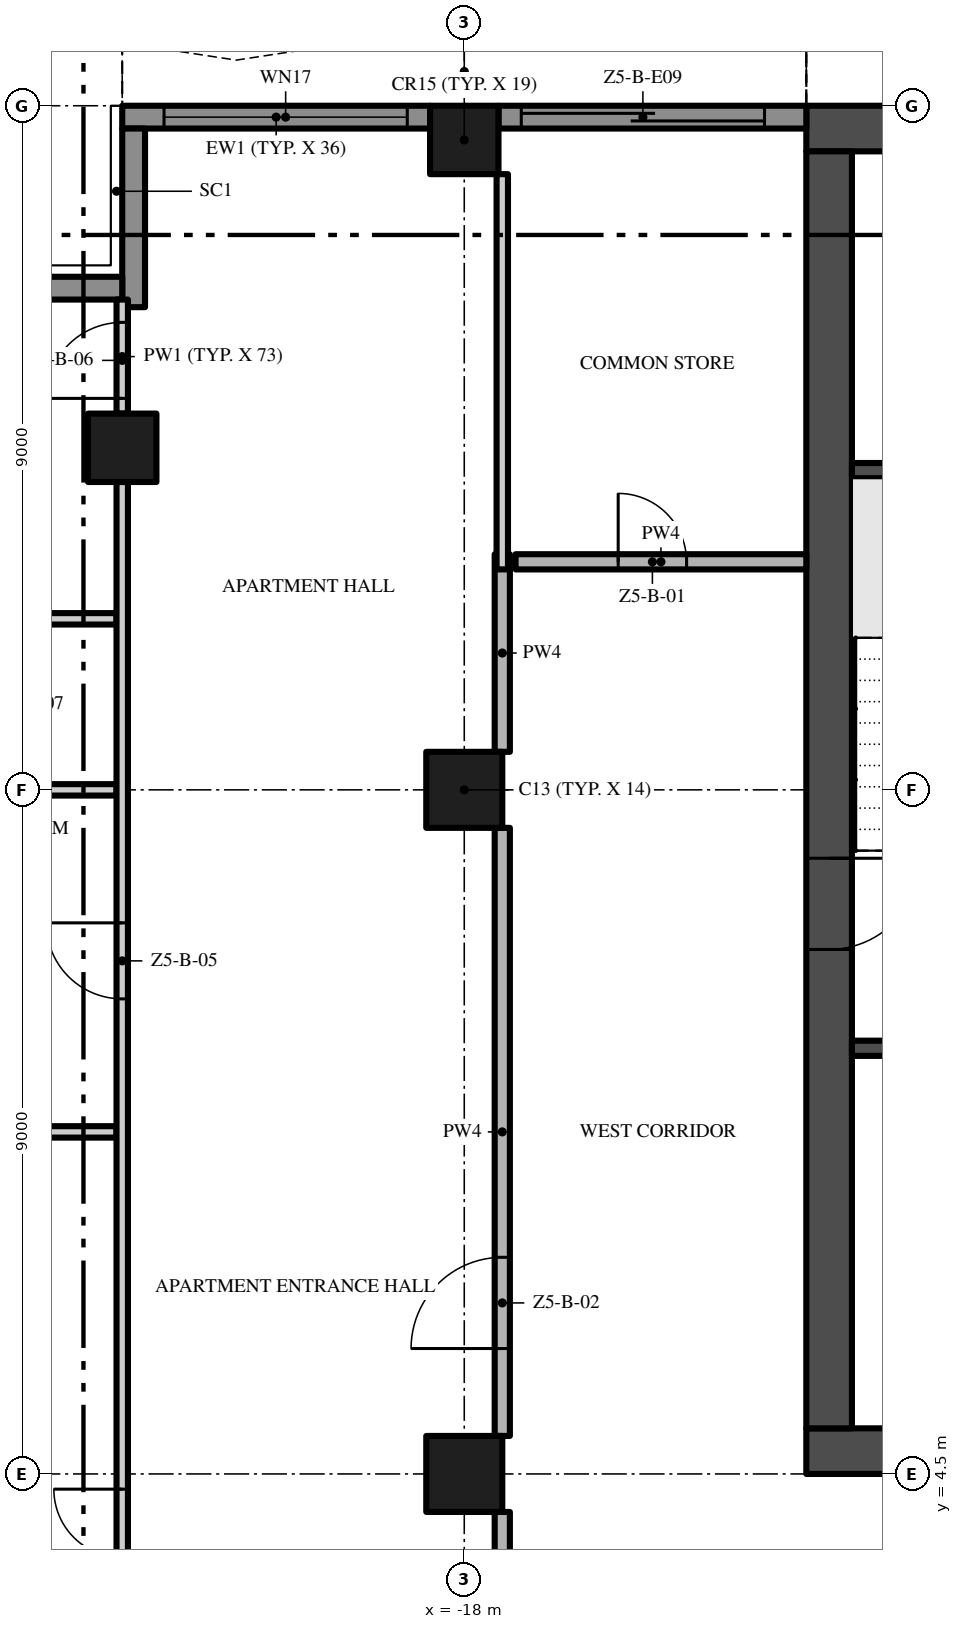
"""IFC4 building model, lengths in metres.
Left out: names, types, materials, properties, quantities, classifications, styles, units other than length and angle.
Written with IfcOpenShell. Run it as: python <this file> out.ifc"""

import sys

from ifc_helpers import new_model, si_unit, direction, frame, frame_2d, origin, origin_2d, place, context, subcontext, project, spatial, polyline, rectangle, outline, extrude, element, fill, save


model = new_model("IFC4")
c1 = context("Model", 3, precision=1e-05, world=origin(), true_north=direction((0.0, 1.0)))
c2 = subcontext(c1, "Body", "Model", "MODEL_VIEW")
j1 = project(units=[si_unit("LENGTHUNIT", "METRE"), si_unit("PLANEANGLEUNIT", "RADIAN")], contexts=[c1])
p1 = place(None, origin())
s1 = spatial("IfcSite", under=j1, at=p1, CompositionType="ELEMENT")
p2 = place(p1, origin())
s2 = spatial("IfcBuilding", under=s1, at=p2, CompositionType="ELEMENT")
p3 = place(p2, frame((0.0, 0.0, 250.2)))
s3 = spatial("IfcBuildingStorey", under=s2, at=p3, CompositionType="ELEMENT", Elevation=250.2)
p4 = place(p3, frame((-13.5, 4.8, -0.3), z_axis=(0.0, 0.0, 1.0), x_axis=(1.0, 0.0, 0.0)))
e1 = element("IfcWall", 1, at=p4, inside=s3, PredefinedType="SHEAR", context=c2, shape_type="SweptSolid", body=[
    extrude(rectangle(XDim=27.0, YDim=0.6, at=frame_2d((13.5, 0.0))), origin(), (0.0, 0.0, 1.0), 3.8),
])
p5 = place(p4, frame((12.0, 0.0, 0.3)))
e2 = element("IfcOpeningElement", 2, at=p5, cuts=e1, PredefinedType="OPENING", context=c2, shape_type="SweptSolid", body=[
    extrude(rectangle(XDim=3.0, YDim=2.4, at=frame_2d((1.5, 1.2))), frame((0.0, 0.31, 0.0), z_axis=(0.0, -1.0, 0.0), x_axis=(1.0, 0.0, 0.0)), (0.0, 0.0, 1.0), 0.62),
])
p6 = place(p4, frame((4.9, 0.0, 0.3)))
e3 = element("IfcOpeningElement", 3, at=p6, cuts=e1, PredefinedType="OPENING", context=c2, shape_type="SweptSolid", body=[
    extrude(rectangle(XDim=1.2, YDim=2.2, at=frame_2d((0.6, 1.1))), frame((0.0, 0.31, 0.0), z_axis=(0.0, -1.0, 0.0), x_axis=(1.0, 0.0, 0.0)), (0.0, 0.0, 1.0), 0.62),
])
p7 = place(p4, frame((20.75, 0.0, 0.3)))
e4 = element("IfcOpeningElement", 4, at=p7, cuts=e1, PredefinedType="OPENING", context=c2, shape_type="SweptSolid", body=[
    extrude(rectangle(XDim=1.5, YDim=2.2, at=frame_2d((0.75, 1.1))), frame((0.0, 0.31, 0.0), z_axis=(0.0, -1.0, 0.0), x_axis=(1.0, 0.0, 0.0)), (0.0, 0.0, 1.0), 0.62),
])
p8 = place(p4, frame((17.4, 0.0, 0.3)))
e5 = element("IfcOpeningElement", 5, at=p8, cuts=e1, PredefinedType="OPENING", context=c2, shape_type="SweptSolid", body=[
    extrude(rectangle(XDim=1.2, YDim=2.2, at=frame_2d((0.6, 1.1))), frame((0.0, 0.31, 0.0), z_axis=(0.0, -1.0, 0.0), x_axis=(1.0, 0.0, 0.0)), (0.0, 0.0, 1.0), 0.62),
])
p9 = place(p3, frame((13.5, 22.2, -0.3), z_axis=(0.0, 0.0, 1.0), x_axis=(-1.0, 0.0, 0.0)))
e6 = element("IfcWall", 6, at=p9, inside=s3, PredefinedType="SHEAR", context=c2, shape_type="SweptSolid", body=[
    extrude(rectangle(XDim=27.0, YDim=0.6, at=frame_2d((13.5, 0.0))), origin(), (0.0, 0.0, 1.0), 3.8),
])
p10 = place(p3, frame((-13.2, 21.9, -0.3), z_axis=(0.0, 0.0, 1.0), x_axis=(0.0, -1.0, 0.0)))
e7 = element("IfcWall", 7, at=p10, inside=s3, PredefinedType="SHEAR", context=c2, shape_type="SweptSolid", body=[
    extrude(rectangle(XDim=16.8, YDim=0.6, at=frame_2d((8.4, 0.0))), origin(), (0.0, 0.0, 1.0), 3.8),
])
p11 = place(p10, frame((9.3, 0.0, 0.3)))
e8 = element("IfcOpeningElement", 8, at=p11, cuts=e7, PredefinedType="OPENING", context=c2, shape_type="SweptSolid", body=[
    extrude(rectangle(XDim=1.2, YDim=2.2, at=frame_2d((0.6, 1.1))), frame((0.0, 0.31, 0.0), z_axis=(0.0, -1.0, 0.0), x_axis=(1.0, 0.0, 0.0)), (0.0, 0.0, 1.0), 0.62),
])
p12 = place(p3, frame((-18.0, 13.5, 0.0), z_axis=(0.0, 0.0, 1.0), x_axis=(1.0, 0.0, 0.0)))
e9 = element("IfcColumn", 9, at=p12, inside=s3, PredefinedType="COLUMN", context=c2, shape_type="SweptSolid", body=[
    extrude(rectangle(XDim=1.0, YDim=1.0, at=origin_2d()), origin(), (0.0, 0.0, 1.0), 3.5),
])
p13 = place(p3, frame((-18.0, 22.05, 0.0), z_axis=(0.0, 0.0, 1.0), x_axis=(1.0, 0.0, 0.0)))
e10 = element("IfcColumn", 10, at=p13, inside=s3, PredefinedType="COLUMN", context=c2, shape_type="SweptSolid", body=[
    extrude(rectangle(XDim=0.9, YDim=0.9, at=origin_2d()), origin(), (0.0, 0.0, 1.0), 3.5),
])
p14 = place(p3, frame((-18.0, 4.5, 0.0), z_axis=(0.0, 0.0, 1.0), x_axis=(1.0, 0.0, 0.0)))
e11 = element("IfcColumn", 11, at=p14, inside=s3, PredefinedType="COLUMN", context=c2, shape_type="SweptSolid", body=[
    extrude(rectangle(XDim=1.0, YDim=1.0, at=origin_2d()), origin(), (0.0, 0.0, 1.0), 3.5),
])
p15 = place(p3, frame((-22.5, 18.0, 0.0), z_axis=(0.0, 0.0, 1.0), x_axis=(1.0, 0.0, 0.0)))
e12 = element("IfcColumn", 12, at=p15, inside=s3, PredefinedType="COLUMN", context=c2, shape_type="SweptSolid", body=[
    extrude(rectangle(XDim=0.9, YDim=0.9, at=origin_2d()), origin(), (0.0, 0.0, 1.0), 3.5),
])
p16 = place(p3, frame((-17.55, 22.35, 0.0), z_axis=(0.0, 0.0, 1.0), x_axis=(1.0, 0.0, 0.0)))
e13 = element("IfcWall", 13, at=p16, inside=s3, PredefinedType="SOLIDWALL", context=c2, shape_type="SweptSolid", body=[
    extrude(rectangle(XDim=4.05, YDim=0.3, at=frame_2d((2.025, 0.0))), origin(), (0.0, 0.0, 1.0), 3.5),
])
p17 = place(p16, frame((0.3, 0.0, 0.0)))
e14 = element("IfcOpeningElement", 14, at=p17, cuts=e13, PredefinedType="OPENING", context=c2, shape_type="SweptSolid", body=[
    extrude(rectangle(XDim=3.2, YDim=2.4, at=frame_2d((1.6, 1.2))), frame((0.0, 0.16, 0.0), z_axis=(0.0, -1.0, 0.0), x_axis=(1.0, 0.0, 0.0)), (0.0, 0.0, 1.0), 0.32),
])
p18 = place(p3, frame((-22.5, 22.35, 0.0), z_axis=(0.0, 0.0, 1.0), x_axis=(1.0, 0.0, 0.0)))
e15 = element("IfcWall", 15, at=p18, inside=s3, PredefinedType="SOLIDWALL", context=c2, shape_type="SweptSolid", body=[
    extrude(rectangle(XDim=4.05, YDim=0.3, at=frame_2d((2.025, 0.0))), origin(), (0.0, 0.0, 1.0), 3.5),
])
p19 = place(p18, frame((0.55, 0.0, 0.45)))
e16 = element("IfcOpeningElement", 16, at=p19, cuts=e15, PredefinedType="OPENING", context=c2, shape_type="SweptSolid", body=[
    extrude(rectangle(XDim=3.2, YDim=2.65, at=frame_2d((1.6, 1.325))), frame((0.0, 0.16, 0.0), z_axis=(0.0, -1.0, 0.0), x_axis=(1.0, 0.0, 0.0)), (0.0, 0.0, 1.0), 0.32),
])
p20 = place(p3, frame((-22.35, 19.85, 0.0), z_axis=(0.0, 0.0, 1.0), x_axis=(0.0, 1.0, 0.0)))
e17 = element("IfcWall", 17, at=p20, inside=s3, PredefinedType="SOLIDWALL", context=c2, shape_type="SweptSolid", body=[
    extrude(rectangle(XDim=2.35, YDim=0.3, at=frame_2d((1.175, 0.0))), origin(), (0.0, 0.0, 1.0), 3.5),
])
p21 = place(p3, frame((-24.75, 20.1, 0.0), z_axis=(0.0, 0.0, 1.0), x_axis=(1.0, 0.0, 0.0)))
e18 = element("IfcWall", 18, at=p21, inside=s3, PredefinedType="SOLIDWALL", context=c2, shape_type="SweptSolid", body=[
    extrude(rectangle(XDim=2.25, YDim=0.3, at=frame_2d((1.125, 0.0))), origin(), (0.0, 0.0, 1.0), 3.5),
])
p22 = place(p3, origin())
e19 = element("IfcWall", 19, at=p22, inside=s3, PredefinedType="USERDEFINED", context=c2, shape_type="SweptSolid", body=[
    extrude(outline(polyline([(-13.5, 25.5), (-15.0, 25.271), (-16.5, 24.671), (-18.0, 23.929), (-19.5, 23.329), (-21.0, 23.1), (-22.5, 23.329), (-22.538, 23.082), (-21.0, 22.847), (-19.434, 23.086), (-17.898, 23.701), (-16.398, 24.442), (-14.934, 25.028), (-13.462, 25.253), (-13.5, 25.5)])), origin(), (0.0, 0.0, 1.0), 0.9),
])
for number, where, z_axis, x_axis in (
    (20, (-12.9, 10.1, 0.0), (0.0, 0.0, 1.0), (1.0, 0.0, 0.0)),
    (21, (-12.9, 17.7, 0.0), (0.0, 0.0, 1.0), (1.0, 0.0, 0.0)),
):
    element("IfcWall", number, at=place(p3, frame(where, z_axis=z_axis, x_axis=x_axis)), inside=s3, PredefinedType="SHEAR", context=c2, shape_type="SweptSolid", body=[
        extrude(rectangle(XDim=3.25, YDim=0.2, at=frame_2d((1.625, 0.0))), origin(), (0.0, 0.0, 1.0), 3.5),
    ])
p23 = place(p3, frame((-26.7, 9.0, 0.0), z_axis=(0.0, 0.0, 1.0), x_axis=(1.0, 0.0, 0.0)))
e22 = element("IfcWall", 22, at=p23, inside=s3, PredefinedType="PARTITIONING", context=c2, shape_type="SweptSolid", body=[
    extrude(rectangle(XDim=4.125, YDim=0.15, at=frame_2d((2.062, 0.0))), origin(), (0.0, 0.0, 1.0), 3.5),
])
p24 = place(p3, frame((-26.1, 13.5, 0.0), z_axis=(0.0, 0.0, 1.0), x_axis=(1.0, 0.0, 0.0)))
e23 = element("IfcWall", 23, at=p24, inside=s3, PredefinedType="PARTITIONING", context=c2, shape_type="SweptSolid", body=[
    extrude(rectangle(XDim=3.525, YDim=0.15, at=frame_2d((1.762, 0.0))), origin(), (0.0, 0.0, 1.0), 3.5),
])
p25 = place(p3, frame((-24.45, 15.75, 0.0), z_axis=(0.0, 0.0, 1.0), x_axis=(1.0, 0.0, 0.0)))
e24 = element("IfcWall", 24, at=p25, inside=s3, PredefinedType="PARTITIONING", context=c2, shape_type="SweptSolid", body=[
    extrude(rectangle(XDim=1.875, YDim=0.15, at=frame_2d((0.938, 0.0))), origin(), (0.0, 0.0, 1.0), 3.5),
])
p26 = place(p3, frame((-17.325, 16.5, 0.0), z_axis=(0.0, 0.0, 1.0), x_axis=(1.0, 0.0, 0.0)))
e25 = element("IfcWall", 25, at=p26, inside=s3, PredefinedType="PARTITIONING", context=c2, shape_type="SweptSolid", body=[
    extrude(rectangle(XDim=3.825, YDim=0.2, at=frame_2d((1.913, 0.0))), origin(), (0.0, 0.0, 1.0), 3.5),
])
p27 = place(p26, frame((1.35, 0.0, 0.0)))
e26 = element("IfcOpeningElement", 26, at=p27, cuts=e25, PredefinedType="OPENING", context=c2, shape_type="SweptSolid", body=[
    extrude(rectangle(XDim=0.9, YDim=2.1, at=frame_2d((0.45, 1.05))), frame((0.0, 0.11, 0.0), z_axis=(0.0, -1.0, 0.0), x_axis=(1.0, 0.0, 0.0)), (0.0, 0.0, 1.0), 0.22),
])
p28 = place(p3, frame((-22.5, 0.1, 0.0), z_axis=(0.0, 0.0, 1.0), x_axis=(0.0, 1.0, 0.0)))
e27 = element("IfcWall", 27, at=p28, inside=s3, PredefinedType="PARTITIONING", context=c2, shape_type="SweptSolid", body=[
    extrude(rectangle(XDim=17.45, YDim=0.15, at=frame_2d((8.725, 0.0))), origin(), (0.0, 0.0, 1.0), 3.5),
])
p29 = place(p28, frame((2.4, 0.0, 0.0)))
e28 = element("IfcOpeningElement", 28, at=p29, cuts=e27, PredefinedType="OPENING", context=c2, shape_type="SweptSolid", body=[
    extrude(rectangle(XDim=1.8, YDim=2.4, at=frame_2d((0.9, 1.2))), frame((0.0, 0.085, 0.0), z_axis=(0.0, -1.0, 0.0), x_axis=(1.0, 0.0, 0.0)), (0.0, 0.0, 1.0), 0.17),
])
p30 = place(p28, frame((10.65, 0.0, 0.0)))
e29 = element("IfcOpeningElement", 29, at=p30, cuts=e27, PredefinedType="OPENING", context=c2, shape_type="SweptSolid", body=[
    extrude(rectangle(XDim=1.0, YDim=2.4, at=frame_2d((0.5, 1.2))), frame((0.0, 0.085, 0.0), z_axis=(0.0, -1.0, 0.0), x_axis=(1.0, 0.0, 0.0)), (0.0, 0.0, 1.0), 0.17),
])
p31 = place(p3, frame((-22.5, 18.45, 0.0), z_axis=(0.0, 0.0, 1.0), x_axis=(0.0, 1.0, 0.0)))
e30 = element("IfcWall", 30, at=p31, inside=s3, PredefinedType="PARTITIONING", context=c2, shape_type="SweptSolid", body=[
    extrude(rectangle(XDim=1.5, YDim=0.15, at=frame_2d((0.75, 0.0))), origin(), (0.0, 0.0, 1.0), 3.5),
])
p32 = place(p31, frame((0.2, 0.0, 0.0)))
e31 = element("IfcOpeningElement", 31, at=p32, cuts=e30, PredefinedType="OPENING", context=c2, shape_type="SweptSolid", body=[
    extrude(rectangle(XDim=1.0, YDim=2.4, at=frame_2d((0.5, 1.2))), frame((0.0, 0.085, 0.0), z_axis=(0.0, -1.0, 0.0), x_axis=(1.0, 0.0, 0.0)), (0.0, 0.0, 1.0), 0.17),
])
p33 = place(p3, frame((-17.5, -0.2, 0.0), z_axis=(0.0, 0.0, 1.0), x_axis=(0.0, 1.0, 0.0)))
e32 = element("IfcWall", 32, at=p33, inside=s3, PredefinedType="PARTITIONING", context=c2, shape_type="SweptSolid", body=[
    extrude(rectangle(XDim=4.2, YDim=0.2, at=frame_2d((2.1, 0.0))), origin(), (0.0, 0.0, 1.0), 3.5),
])
p34 = place(p3, frame((-17.5, 5.0, 0.0), z_axis=(0.0, 0.0, 1.0), x_axis=(0.0, 1.0, 0.0)))
e33 = element("IfcWall", 33, at=p34, inside=s3, PredefinedType="PARTITIONING", context=c2, shape_type="SweptSolid", body=[
    extrude(rectangle(XDim=8.0, YDim=0.2, at=frame_2d((4.0, 0.0))), origin(), (0.0, 0.0, 1.0), 3.5),
])
p35 = place(p34, frame((1.15, 0.0, 0.0)))
e34 = element("IfcOpeningElement", 34, at=p35, cuts=e33, PredefinedType="OPENING", context=c2, shape_type="SweptSolid", body=[
    extrude(rectangle(XDim=1.2, YDim=2.4, at=frame_2d((0.6, 1.2))), frame((0.0, 0.11, 0.0), z_axis=(0.0, -1.0, 0.0), x_axis=(1.0, 0.0, 0.0)), (0.0, 0.0, 1.0), 0.22),
])
p36 = place(p3, frame((-17.5, 14.0, 0.0), z_axis=(0.0, 0.0, 1.0), x_axis=(0.0, 1.0, 0.0)))
e35 = element("IfcWall", 35, at=p36, inside=s3, PredefinedType="PARTITIONING", context=c2, shape_type="SweptSolid", body=[
    extrude(rectangle(XDim=2.6, YDim=0.2, at=frame_2d((1.3, 0.0))), origin(), (0.0, 0.0, 1.0), 3.5),
])
p37 = place(p3, frame((-17.5, 16.4, 0.0), z_axis=(0.0, 0.0, 1.0), x_axis=(0.0, 1.0, 0.0)))
e36 = element("IfcWall", 36, at=p37, inside=s3, PredefinedType="PARTITIONING", context=c2, shape_type="SweptSolid", body=[
    extrude(rectangle(XDim=5.2, YDim=0.15, at=frame_2d((2.6, 0.0))), origin(), (0.0, 0.0, 1.0), 3.5),
])
p38 = place(p17, origin())
e37 = element("IfcDoor", 37, at=p38, inside=s3, OperationType="SINGLE_SWING_LEFT", PredefinedType="DOOR", context=c2, shape_type="SweptSolid", body=[
    extrude(rectangle(XDim=3.2, YDim=2.4, at=frame_2d((1.6, 1.2))), frame((0.0, 0.025, 0.0), z_axis=(0.0, -1.0, 0.0), x_axis=(1.0, 0.0, 0.0)), (0.0, 0.0, 1.0), 0.05),
])
fill(e14, e37)
p39 = place(p19, origin())
e38 = element("IfcWindow", 38, at=p39, inside=s3, PartitioningType="SINGLE_PANEL", PredefinedType="WINDOW", context=c2, shape_type="SweptSolid", body=[
    extrude(rectangle(XDim=3.2, YDim=2.65, at=frame_2d((1.6, 1.325))), frame((0.0, 0.03, 0.0), z_axis=(0.0, -1.0, 0.0), x_axis=(1.0, 0.0, 0.0)), (0.0, 0.0, 1.0), 0.06),
])
fill(e16, e38)
p40 = place(p11, frame((1.2, 0.0, 0.0), z_axis=(0.0, 0.0, 1.0), x_axis=(-1.0, 0.0, 0.0)))
e39 = element("IfcDoor", 39, at=p40, inside=s3, OperationType="SINGLE_SWING_RIGHT", PredefinedType="DOOR", context=c2, shape_type="SweptSolid", body=[
    extrude(rectangle(XDim=1.2, YDim=2.2, at=frame_2d((0.6, 1.1))), frame((0.0, 0.025, 0.0), z_axis=(0.0, -1.0, 0.0), x_axis=(1.0, 0.0, 0.0)), (0.0, 0.0, 1.0), 0.05),
])
fill(e8, e39)
p41 = place(p27, origin())
e40 = element("IfcDoor", 40, at=p41, inside=s3, OperationType="SINGLE_SWING_LEFT", PredefinedType="DOOR", context=c2, shape_type="SweptSolid", body=[
    extrude(rectangle(XDim=0.9, YDim=2.1, at=frame_2d((0.45, 1.05))), frame((0.0, 0.025, 0.0), z_axis=(0.0, -1.0, 0.0), x_axis=(1.0, 0.0, 0.0)), (0.0, 0.0, 1.0), 0.05),
])
fill(e26, e40)
p42 = place(p35, origin())
e41 = element("IfcDoor", 41, at=p42, inside=s3, OperationType="SINGLE_SWING_LEFT", PredefinedType="DOOR", context=c2, shape_type="SweptSolid", body=[
    extrude(rectangle(XDim=1.2, YDim=2.4, at=frame_2d((0.6, 1.2))), frame((0.0, 0.025, 0.0), z_axis=(0.0, -1.0, 0.0), x_axis=(1.0, 0.0, 0.0)), (0.0, 0.0, 1.0), 0.05),
])
fill(e34, e41)
p43 = place(p29, origin())
e42 = element("IfcDoor", 42, at=p43, inside=s3, OperationType="DOUBLE_DOOR_SINGLE_SWING", PredefinedType="DOOR", context=c2, shape_type="SweptSolid", body=[
    extrude(rectangle(XDim=1.8, YDim=2.4, at=frame_2d((0.9, 1.2))), frame((0.0, 0.025, 0.0), z_axis=(0.0, -1.0, 0.0), x_axis=(1.0, 0.0, 0.0)), (0.0, 0.0, 1.0), 0.05),
])
fill(e28, e42)
p44 = place(p30, origin())
e43 = element("IfcDoor", 43, at=p44, inside=s3, OperationType="SINGLE_SWING_RIGHT", PredefinedType="DOOR", context=c2, shape_type="SweptSolid", body=[
    extrude(rectangle(XDim=1.0, YDim=2.4, at=frame_2d((0.5, 1.2))), frame((0.0, 0.025, 0.0), z_axis=(0.0, -1.0, 0.0), x_axis=(1.0, 0.0, 0.0)), (0.0, 0.0, 1.0), 0.05),
])
fill(e29, e43)
p45 = place(p32, origin())
e44 = element("IfcDoor", 44, at=p45, inside=s3, OperationType="SINGLE_SWING_LEFT", PredefinedType="DOOR", context=c2, shape_type="SweptSolid", body=[
    extrude(rectangle(XDim=1.0, YDim=2.4, at=frame_2d((0.5, 1.2))), frame((0.0, 0.025, 0.0), z_axis=(0.0, -1.0, 0.0), x_axis=(1.0, 0.0, 0.0)), (0.0, 0.0, 1.0), 0.05),
])
fill(e31, e44)
save(model, sys.argv[1])
